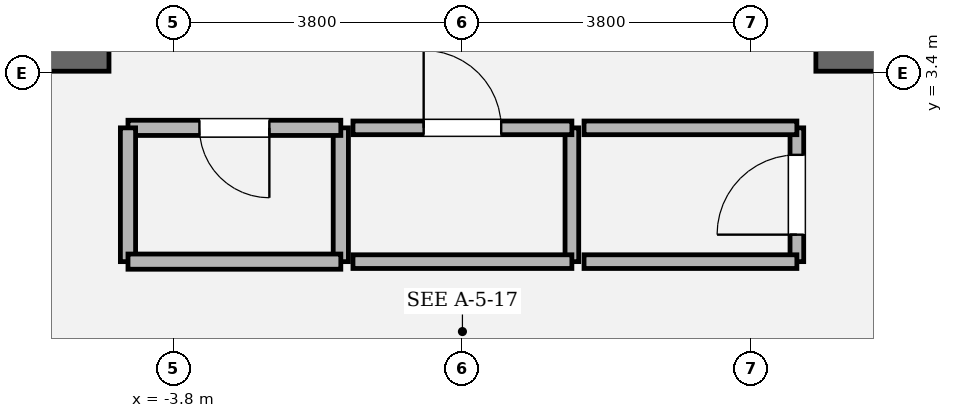
"""IFC4 building model, lengths in metres.
Left out: names, types, materials, properties, quantities, classifications, styles, units other than length and angle.
Written with IfcOpenShell. Run it as: python <this file> out.ifc"""

import sys

from ifc_helpers import new_model, si_unit, direction, frame, frame_2d, origin, place, context, subcontext, project, spatial, rectangle, extrude, element, fill, save


model = new_model("IFC4")
c1 = context("Model", 3, precision=1e-05, world=origin(), true_north=direction((0.0, 1.0)))
c2 = subcontext(c1, "Body", "Model", "MODEL_VIEW")
j1 = project(units=[si_unit("LENGTHUNIT", "METRE"), si_unit("PLANEANGLEUNIT", "RADIAN")], contexts=[c1])
p1 = place(None, origin())
s1 = spatial("IfcSite", under=j1, at=p1, CompositionType="ELEMENT")
p2 = place(p1, origin())
s2 = spatial("IfcBuilding", under=s1, at=p2, CompositionType="ELEMENT")
p3 = place(p2, frame((0.0, 0.0, 80.85)))
s3 = spatial("IfcBuildingStorey", under=s2, at=p3, CompositionType="ELEMENT", Elevation=80.85)
for number, where, z_axis, x_axis in (
    (1, (-9.825, 3.6, 0.0), (0.0, 0.0, 1.0), (1.0, 0.0, 0.0)),
    (2, (4.65, 3.6, 0.0), (0.0, 0.0, 1.0), (1.0, 0.0, 0.0)),
):
    element("IfcWall", number, at=place(p3, frame(where, z_axis=z_axis, x_axis=x_axis)), inside=s3, PredefinedType="SOLIDWALL", context=c2, shape_type="SweptSolid", body=[
        extrude(rectangle(XDim=5.175, YDim=0.35, at=frame_2d((2.587, 0.0))), origin(), (0.0, 0.0, 1.0), 4.05),
    ])
p4 = place(p3, frame((-1.6, 0.92, 0.0), z_axis=(0.0, 0.0, 1.0), x_axis=(0.0, 1.0, 0.0)))
e3 = element("IfcWall", 3, at=p4, inside=s3, PredefinedType="SOLIDWALL", context=c2, shape_type="SweptSolid", body=[
    extrude(rectangle(XDim=1.76, YDim=0.2, at=frame_2d((0.88, 0.0))), origin(), (0.0, 0.0, 1.0), 3.81),
])
p5 = place(p3, frame((-1.6, 2.68, 0.0), z_axis=(0.0, 0.0, 1.0), x_axis=(-1.0, 0.0, 0.0)))
e4 = element("IfcWall", 4, at=p5, inside=s3, PredefinedType="SOLIDWALL", context=c2, shape_type="SweptSolid", body=[
    extrude(rectangle(XDim=2.8, YDim=0.2, at=frame_2d((1.4, 0.0))), origin(), (0.0, 0.0, 1.0), 3.81),
])
p6 = place(p5, frame((0.94, 0.0, 0.0)))
e5 = element("IfcOpeningElement", 5, at=p6, cuts=e4, PredefinedType="OPENING", context=c2, shape_type="SweptSolid", body=[
    extrude(rectangle(XDim=0.92, YDim=2.1, at=frame_2d((0.46, 1.05))), frame((0.0, 0.11, 0.0), z_axis=(0.0, -1.0, 0.0), x_axis=(1.0, 0.0, 0.0)), (0.0, 0.0, 1.0), 0.22),
])
p7 = place(p3, frame((-4.4, 2.68, 0.0), z_axis=(0.0, 0.0, 1.0), x_axis=(0.0, -1.0, 0.0)))
e6 = element("IfcWall", 6, at=p7, inside=s3, PredefinedType="SOLIDWALL", context=c2, shape_type="SweptSolid", body=[
    extrude(rectangle(XDim=1.76, YDim=0.2, at=frame_2d((0.88, 0.0))), origin(), (0.0, 0.0, 1.0), 3.81),
])
p8 = place(p3, frame((-4.4, 0.92, 0.0), z_axis=(0.0, 0.0, 1.0), x_axis=(1.0, 0.0, 0.0)))
e7 = element("IfcWall", 7, at=p8, inside=s3, PredefinedType="SOLIDWALL", context=c2, shape_type="SweptSolid", body=[
    extrude(rectangle(XDim=2.8, YDim=0.2, at=frame_2d((1.4, 0.0))), origin(), (0.0, 0.0, 1.0), 3.81),
])
p9 = place(p3, frame((1.44, 0.92, 0.0), z_axis=(0.0, 0.0, 1.0), x_axis=(0.0, 1.0, 0.0)))
e8 = element("IfcWall", 8, at=p9, inside=s3, PredefinedType="PARTITIONING", context=c2, shape_type="SweptSolid", body=[
    extrude(rectangle(XDim=1.76, YDim=0.18, at=frame_2d((0.88, 0.0))), origin(), (0.0, 0.0, 1.0), 3.81),
])
p10 = place(p3, frame((1.44, 2.68, 0.0), z_axis=(0.0, 0.0, 1.0), x_axis=(-1.0, 0.0, 0.0)))
e9 = element("IfcWall", 9, at=p10, inside=s3, PredefinedType="PARTITIONING", context=c2, shape_type="SweptSolid", body=[
    extrude(rectangle(XDim=2.88, YDim=0.18, at=frame_2d((1.44, 0.0))), origin(), (0.0, 0.0, 1.0), 3.81),
])
p11 = place(p10, frame((0.93, 0.0, 0.0)))
e10 = element("IfcOpeningElement", 10, at=p11, cuts=e9, PredefinedType="OPENING", context=c2, shape_type="SweptSolid", body=[
    extrude(rectangle(XDim=1.02, YDim=2.2, at=frame_2d((0.51, 1.1))), frame((0.0, 0.1, 0.0), z_axis=(0.0, -1.0, 0.0), x_axis=(1.0, 0.0, 0.0)), (0.0, 0.0, 1.0), 0.2),
])
p12 = place(p3, frame((-1.44, 0.92, 0.0), z_axis=(0.0, 0.0, 1.0), x_axis=(1.0, 0.0, 0.0)))
e11 = element("IfcWall", 11, at=p12, inside=s3, PredefinedType="PARTITIONING", context=c2, shape_type="SweptSolid", body=[
    extrude(rectangle(XDim=2.88, YDim=0.18, at=frame_2d((1.44, 0.0))), origin(), (0.0, 0.0, 1.0), 3.81),
])
p13 = place(p3, frame((4.4, 0.92, 0.0), z_axis=(0.0, 0.0, 1.0), x_axis=(0.0, 1.0, 0.0)))
e12 = element("IfcWall", 12, at=p13, inside=s3, PredefinedType="PARTITIONING", context=c2, shape_type="SweptSolid", body=[
    extrude(rectangle(XDim=1.76, YDim=0.18, at=frame_2d((0.88, 0.0))), origin(), (0.0, 0.0, 1.0), 3.81),
])
p14 = place(p13, frame((0.355, 0.0, 0.0)))
e13 = element("IfcOpeningElement", 13, at=p14, cuts=e12, PredefinedType="OPENING", context=c2, shape_type="SweptSolid", body=[
    extrude(rectangle(XDim=1.05, YDim=2.2, at=frame_2d((0.525, 1.1))), frame((0.0, 0.1, 0.0), z_axis=(0.0, -1.0, 0.0), x_axis=(1.0, 0.0, 0.0)), (0.0, 0.0, 1.0), 0.2),
])
for number, where, z_axis, x_axis in (
    (14, (4.4, 2.68, 0.0), (0.0, 0.0, 1.0), (-1.0, 0.0, 0.0)),
    (15, (1.6, 0.92, 0.0), (0.0, 0.0, 1.0), (1.0, 0.0, 0.0)),
):
    element("IfcWall", number, at=place(p3, frame(where, z_axis=z_axis, x_axis=x_axis)), inside=s3, PredefinedType="PARTITIONING", context=c2, shape_type="SweptSolid", body=[
        extrude(rectangle(XDim=2.8, YDim=0.18, at=frame_2d((1.4, 0.0))), origin(), (0.0, 0.0, 1.0), 3.81),
    ])
p15 = place(p6, origin())
e16 = element("IfcDoor", 16, at=p15, inside=s3, OperationType="SINGLE_SWING_LEFT", PredefinedType="DOOR", context=c2, shape_type="SweptSolid", body=[
    extrude(rectangle(XDim=0.92, YDim=2.1, at=frame_2d((0.46, 1.05))), frame((0.0, 0.025, 0.0), z_axis=(0.0, -1.0, 0.0), x_axis=(1.0, 0.0, 0.0)), (0.0, 0.0, 1.0), 0.05),
])
fill(e5, e16)
p16 = place(p11, origin())
e17 = element("IfcDoor", 17, at=p16, inside=s3, OperationType="SINGLE_SWING_RIGHT", PredefinedType="DOOR", context=c2, shape_type="SweptSolid", body=[
    extrude(rectangle(XDim=1.02, YDim=2.2, at=frame_2d((0.51, 1.1))), frame((0.0, 0.025, 0.0), z_axis=(0.0, -1.0, 0.0), x_axis=(1.0, 0.0, 0.0)), (0.0, 0.0, 1.0), 0.05),
])
fill(e10, e17)
p17 = place(p14, origin())
e18 = element("IfcDoor", 18, at=p17, inside=s3, OperationType="SINGLE_SWING_LEFT", PredefinedType="DOOR", context=c2, shape_type="SweptSolid", body=[
    extrude(rectangle(XDim=1.05, YDim=2.2, at=frame_2d((0.525, 1.1))), frame((0.0, 0.025, 0.0), z_axis=(0.0, -1.0, 0.0), x_axis=(1.0, 0.0, 0.0)), (0.0, 0.0, 1.0), 0.05),
])
fill(e13, e18)
save(model, sys.argv[1])
